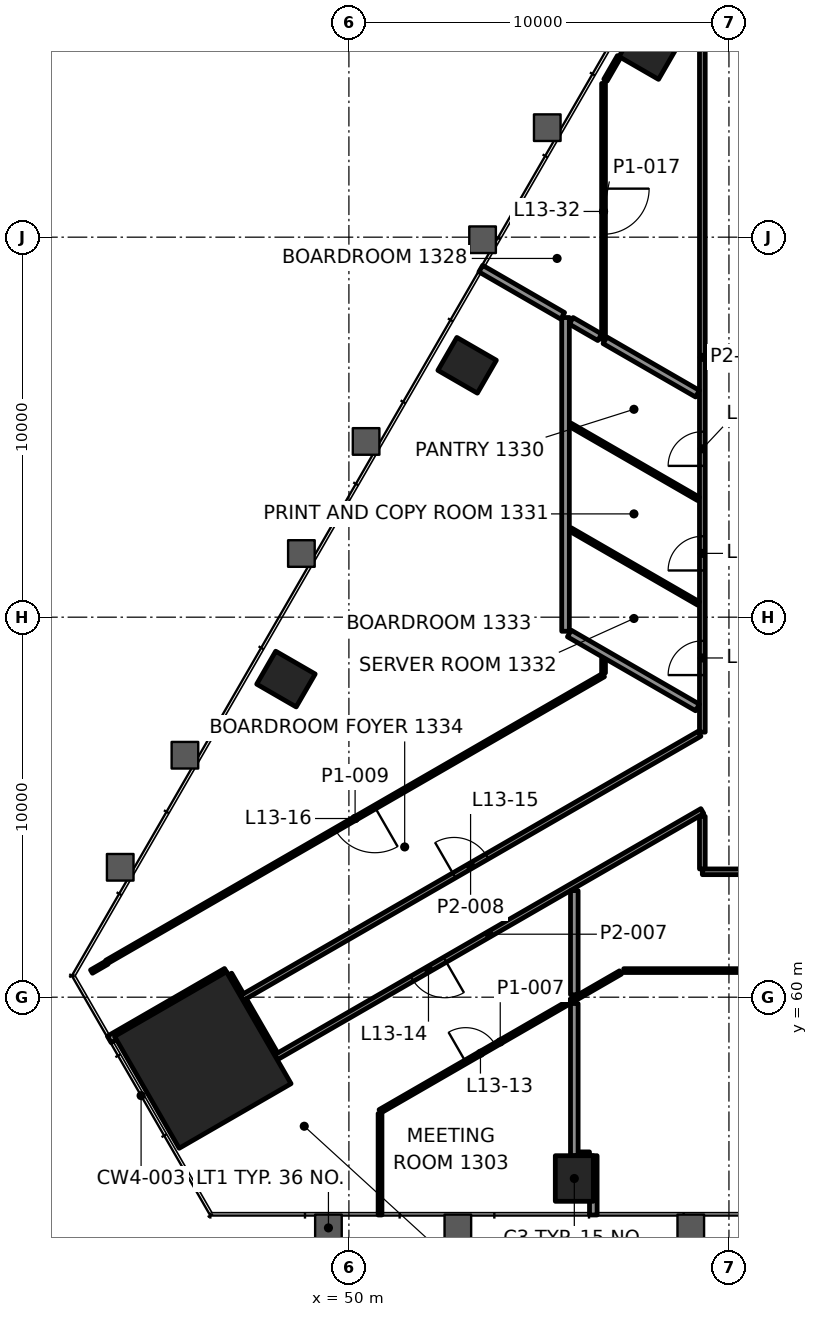
"""IFC4 building model, lengths in metres.
Left out: names, types, materials, properties, quantities, classifications, styles, units other than length and angle.
Written with IfcOpenShell. Run it as: python <this file> out.ifc"""

import sys

from ifc_helpers import new_model, si_unit, direction, frame, frame_2d, origin, origin_2d, place, context, subcontext, project, spatial, rectangle, extrude, element, fill, save


model = new_model("IFC4")
c1 = context("Model", 3, precision=1e-05, world=origin(), true_north=direction((0.0, 1.0)))
c2 = subcontext(c1, "Body", "Model", "MODEL_VIEW")
j1 = project(units=[si_unit("LENGTHUNIT", "METRE"), si_unit("PLANEANGLEUNIT", "RADIAN")], contexts=[c1])
p1 = place(None, origin())
s1 = spatial("IfcSite", under=j1, at=p1, CompositionType="ELEMENT")
p2 = place(p1, origin())
s2 = spatial("IfcBuilding", under=s1, at=p2, CompositionType="ELEMENT")
p3 = place(p2, frame((0.0, 0.0, 61.0)))
s3 = spatial("IfcBuildingStorey", under=s2, at=p3, CompositionType="ELEMENT", Elevation=61.0)
p4 = place(p3, frame((46.156, 58.347, 0.0), z_axis=(0.0, 0.0, 1.0), x_axis=(0.5, -0.866025403784, 0.0)))
e1 = element("IfcColumn", 1, at=p4, inside=s3, PredefinedType="COLUMN", context=c2, shape_type="SweptSolid", body=[
    extrude(rectangle(XDim=3.4, YDim=3.4, at=origin_2d()), origin(), (0.0, 0.0, 1.0), 4.2),
])
for number, where, z_axis, x_axis in (
    (2, (55.931, 55.229, -0.0), (0.0, 0.0, 1.0), (1.0, 0.0, 0.0)),
    (3, (57.878, 84.885, -0.0), (0.0, 0.0, 1.0), (-0.5, -0.866, 0.0)),
    (4, (53.111, 76.628, -0.0), (0.0, 0.0, 1.0), (-0.5, -0.866, 0.0)),
    (5, (48.343, 68.371, -0.0), (0.0, 0.0, 1.0), (-0.5, -0.866, 0.0)),
):
    element("IfcColumn", number, at=place(p3, frame(where, z_axis=z_axis, x_axis=x_axis)), inside=s3, PredefinedType="COLUMN", context=c2, shape_type="SweptSolid", body=[
        extrude(rectangle(XDim=1.0, YDim=1.2, at=origin_2d()), origin(), (0.0, 0.0, 1.0), 4.2),
    ])
p5 = place(p3, frame((56.031, 55.829, 0.0), z_axis=(0.0, 0.0, 1.0), x_axis=(1.0, 0.0, 0.0)))
e6 = element("IfcWall", 6, at=p5, inside=s3, PredefinedType="PARTITIONING", context=c2, shape_type="SweptSolid", body=[
    extrude(rectangle(XDim=0.3, YDim=0.2, at=frame_2d((0.15, 0.0))), origin(), (0.0, 0.0, 1.0), 3.4),
])
p6 = place(p3, frame((57.232, 60.7, 0.0), z_axis=(0.0, 0.0, 1.0), x_axis=(1.0, 0.0, 0.0)))
e7 = element("IfcWall", 7, at=p6, inside=s3, PredefinedType="PARTITIONING", context=c2, shape_type="SweptSolid", body=[
    extrude(rectangle(XDim=15.385, YDim=0.1, at=frame_2d((7.692, 0.0))), origin(), (0.0, 0.0, 1.0), 3.4),
])
p7 = place(p6, frame((7.192, 0.0, 0.0)))
e8 = element("IfcOpeningElement", 8, at=p7, cuts=e7, PredefinedType="OPENING", context=c2, shape_type="SweptSolid", body=[
    extrude(rectangle(XDim=1.0, YDim=2.1, at=frame_2d((0.5, 1.05))), frame((0.0, 0.06, 0.0), z_axis=(0.0, -1.0, 0.0), x_axis=(1.0, 0.0, 0.0)), (0.0, 0.0, 1.0), 0.12),
])
p8 = place(p3, frame((90.699, 63.3, 0.0), z_axis=(0.0, 0.0, 1.0), x_axis=(-1.0, 0.0, 0.0)))
e9 = element("IfcWall", 9, at=p8, inside=s3, PredefinedType="PARTITIONING", context=c2, shape_type="SweptSolid", body=[
    extrude(rectangle(XDim=31.399, YDim=0.15, at=frame_2d((15.7, 0.0))), origin(), (0.0, 0.0, 1.0), 3.4),
])
p9 = place(p8, frame((4.968, 0.0, 0.0)))
e10 = element("IfcOpeningElement", 10, at=p9, cuts=e9, PredefinedType="OPENING", context=c2, shape_type="SweptSolid", body=[
    extrude(rectangle(XDim=1.2, YDim=2.1, at=frame_2d((0.6, 1.05))), frame((0.0, 0.085, 0.0), z_axis=(0.0, -1.0, 0.0), x_axis=(1.0, 0.0, 0.0)), (0.0, 0.0, 1.0), 0.17),
])
p10 = place(p8, frame((13.908, 0.0, 0.0)))
e11 = element("IfcOpeningElement", 11, at=p10, cuts=e9, PredefinedType="OPENING", context=c2, shape_type="SweptSolid", body=[
    extrude(rectangle(XDim=1.2, YDim=2.1, at=frame_2d((0.6, 1.05))), frame((0.0, 0.085, 0.0), z_axis=(0.0, -1.0, 0.0), x_axis=(1.0, 0.0, 0.0)), (0.0, 0.0, 1.0), 0.17),
])
p11 = place(p8, frame((24.14, 0.0, 0.0)))
e12 = element("IfcOpeningElement", 12, at=p11, cuts=e9, PredefinedType="OPENING", context=c2, shape_type="SweptSolid", body=[
    extrude(rectangle(XDim=1.0, YDim=2.1, at=frame_2d((0.5, 1.05))), frame((0.0, 0.085, 0.0), z_axis=(0.0, -1.0, 0.0), x_axis=(1.0, 0.0, 0.0)), (0.0, 0.0, 1.0), 0.17),
])
p12 = place(p3, frame((50.819, 56.998, 0.0), z_axis=(0.0, 0.0, 1.0), x_axis=(0.866023631393, 0.50000306986, 0.0)))
e13 = element("IfcWall", 13, at=p12, inside=s3, PredefinedType="PARTITIONING", context=c2, shape_type="SweptSolid", body=[
    extrude(rectangle(XDim=7.305, YDim=0.1, at=frame_2d((3.653, 0.0))), origin(), (0.0, 0.0, 1.0), 3.4),
])
p13 = place(p12, frame((2.602, 0.0, 0.0)))
e14 = element("IfcOpeningElement", 14, at=p13, cuts=e13, PredefinedType="OPENING", context=c2, shape_type="SweptSolid", body=[
    extrude(rectangle(XDim=0.9, YDim=2.1, at=frame_2d((0.45, 1.05))), frame((0.0, 0.06, 0.0), z_axis=(0.0, -1.0, 0.0), x_axis=(1.0, 0.0, 0.0)), (0.0, 0.0, 1.0), 0.12),
])
p14 = place(p3, frame((59.3, 64.896, 0.0), z_axis=(0.0, 0.0, 1.0), x_axis=(-0.86602302899, -0.500004113243, 0.0)))
e15 = element("IfcWall", 15, at=p14, inside=s3, PredefinedType="PARTITIONING", context=c2, shape_type="SweptSolid", body=[
    extrude(rectangle(XDim=12.956, YDim=0.15, at=frame_2d((6.478, 0.0))), origin(), (0.0, 0.0, 1.0), 3.247),
])
p15 = place(p14, frame((7.821, 0.0, 0.0)))
e16 = element("IfcOpeningElement", 16, at=p15, cuts=e15, PredefinedType="OPENING", context=c2, shape_type="SweptSolid", body=[
    extrude(rectangle(XDim=1.0, YDim=2.1, at=frame_2d((0.5, 1.05))), frame((0.0, 0.085, 0.0), z_axis=(0.0, -1.0, 0.0), x_axis=(1.0, 0.0, 0.0)), (0.0, 0.0, 1.0), 0.17),
])
p16 = place(p3, frame((47.178, 59.976, 0.0), z_axis=(0.0, 0.0, 1.0), x_axis=(0.866019280802, 0.500010605167, 0.0)))
e17 = element("IfcWall", 17, at=p16, inside=s3, PredefinedType="PARTITIONING", context=c2, shape_type="SweptSolid", body=[
    extrude(rectangle(XDim=13.91, YDim=0.15, at=frame_2d((6.955, 0.0))), origin(), (0.0, 0.0, 1.0), 3.4),
])
p17 = place(p16, frame((6.455, 0.0, 0.0)))
e18 = element("IfcOpeningElement", 18, at=p17, cuts=e17, PredefinedType="OPENING", context=c2, shape_type="SweptSolid", body=[
    extrude(rectangle(XDim=1.0, YDim=2.1, at=frame_2d((0.5, 1.05))), frame((0.0, 0.085, 0.0), z_axis=(0.0, -1.0, 0.0), x_axis=(1.0, 0.0, 0.0)), (0.0, 0.0, 1.0), 0.17),
])
p18 = place(p3, frame((43.695, 58.888, 0.0), z_axis=(0.0, 0.0, 1.0), x_axis=(0.866031398331, 0.499989616998, 0.0)))
e19 = element("IfcWall", 19, at=p18, inside=s3, PredefinedType="PARTITIONING", context=c2, shape_type="SweptSolid", body=[
    extrude(rectangle(XDim=3.56, YDim=0.2, at=frame_2d((1.78, 0.0))), origin(), (0.0, 0.0, 1.0), 3.4),
])
p19 = place(p3, frame((43.226, 60.674, 0.0), z_axis=(0.0, 0.0, 1.0), x_axis=(0.866073792734, 0.499916178513, 0.0)))
e20 = element("IfcWall", 20, at=p19, inside=s3, PredefinedType="PARTITIONING", context=c2, shape_type="SweptSolid", body=[
    extrude(rectangle(XDim=0.473, YDim=0.1, at=frame_2d((0.236, 0.0))), origin(), (0.0, 0.0, 1.0), 3.4),
])
p20 = place(p3, frame((56.7, 68.476, 0.0), z_axis=(0.0, 0.0, 1.0), x_axis=(-0.866026152489, -0.499998703203, 0.0)))
e21 = element("IfcWall", 21, at=p20, inside=s3, PredefinedType="PARTITIONING", context=c2, shape_type="SweptSolid", body=[
    extrude(rectangle(XDim=15.096, YDim=0.1, at=frame_2d((7.548, 0.0))), origin(), (0.0, 0.0, 1.0), 3.4),
])
p21 = place(p20, frame((6.948, 0.0, 0.0)))
e22 = element("IfcOpeningElement", 22, at=p21, cuts=e21, PredefinedType="OPENING", context=c2, shape_type="SweptSolid", body=[
    extrude(rectangle(XDim=1.2, YDim=2.1, at=frame_2d((0.6, 1.05))), frame((0.0, 0.06, 0.0), z_axis=(0.0, -1.0, 0.0), x_axis=(1.0, 0.0, 0.0)), (0.0, 0.0, 1.0), 0.12),
])
p22 = place(p3, frame((56.75, 84.132, 0.0), z_axis=(0.0, 0.0, 1.0), x_axis=(0.49987987985, 0.866094744079, 0.0)))
e23 = element("IfcWall", 23, at=p22, inside=s3, PredefinedType="PARTITIONING", context=c2, shape_type="SweptSolid", body=[
    extrude(rectangle(XDim=0.716, YDim=0.1, at=frame_2d((0.358, 0.0))), origin(), (0.0, 0.0, 1.0), 3.4),
])
p23 = place(p3, frame((59.3, 63.375, 0.0), z_axis=(0.0, 0.0, 1.0), x_axis=(0.0, 1.0, 0.0)))
e24 = element("IfcWall", 24, at=p23, inside=s3, PredefinedType="PARTITIONING", context=c2, shape_type="SweptSolid", body=[
    extrude(rectangle(XDim=1.385, YDim=0.15, at=frame_2d((0.692, 0.0))), origin(), (0.0, 0.0, 1.0), 3.247),
])
p24 = place(p3, frame((59.3, 66.975, 0.0), z_axis=(0.0, 0.0, 1.0), x_axis=(0.0, 1.0, 0.0)))
e25 = element("IfcWall", 25, at=p24, inside=s3, PredefinedType="PARTITIONING", context=c2, shape_type="SweptSolid", body=[
    extrude(rectangle(XDim=19.725, YDim=0.15, at=frame_2d((9.862, 0.0))), origin(), (0.0, 0.0, 1.0), 3.4),
])
p25 = place(p24, frame((1.502, 0.0, 0.0)))
e26 = element("IfcOpeningElement", 26, at=p25, cuts=e25, PredefinedType="OPENING", context=c2, shape_type="SweptSolid", body=[
    extrude(rectangle(XDim=0.9, YDim=2.1, at=frame_2d((0.45, 1.05))), frame((0.0, 0.085, 0.0), z_axis=(0.0, -1.0, 0.0), x_axis=(1.0, 0.0, 0.0)), (0.0, 0.0, 1.0), 0.17),
])
p26 = place(p24, frame((4.254, 0.0, 0.0)))
e27 = element("IfcOpeningElement", 27, at=p26, cuts=e25, PredefinedType="OPENING", context=c2, shape_type="SweptSolid", body=[
    extrude(rectangle(XDim=0.9, YDim=2.1, at=frame_2d((0.45, 1.05))), frame((0.0, 0.085, 0.0), z_axis=(0.0, -1.0, 0.0), x_axis=(1.0, 0.0, 0.0)), (0.0, 0.0, 1.0), 0.17),
])
p27 = place(p24, frame((7.007, 0.0, 0.0)))
e28 = element("IfcOpeningElement", 28, at=p27, cuts=e25, PredefinedType="OPENING", context=c2, shape_type="SweptSolid", body=[
    extrude(rectangle(XDim=0.9, YDim=2.1, at=frame_2d((0.45, 1.05))), frame((0.0, 0.085, 0.0), z_axis=(0.0, -1.0, 0.0), x_axis=(1.0, 0.0, 0.0)), (0.0, 0.0, 1.0), 0.17),
])
p28 = place(p3, frame((56.7, 68.534, 0.0), z_axis=(0.0, 0.0, 1.0), x_axis=(0.0, 1.0, 0.0)))
e29 = element("IfcWall", 29, at=p28, inside=s3, PredefinedType="PARTITIONING", context=c2, shape_type="SweptSolid", body=[
    extrude(rectangle(XDim=0.372, YDim=0.1, at=frame_2d((0.186, 0.0))), origin(), (0.0, 0.0, 1.0), 3.4),
])
p29 = place(p3, frame((56.7, 84.046, 0.0), z_axis=(0.0, 0.0, 1.0), x_axis=(0.0, -1.0, 0.0)))
e30 = element("IfcWall", 30, at=p29, inside=s3, PredefinedType="PARTITIONING", context=c2, shape_type="SweptSolid", body=[
    extrude(rectangle(XDim=6.737, YDim=0.1, at=frame_2d((3.369, 0.0))), origin(), (0.0, 0.0, 1.0), 3.165),
])
p30 = place(p29, frame((2.769, 0.0, 0.0)))
e31 = element("IfcOpeningElement", 31, at=p30, cuts=e30, PredefinedType="OPENING", context=c2, shape_type="SweptSolid", body=[
    extrude(rectangle(XDim=1.2, YDim=2.1, at=frame_2d((0.6, 1.05))), frame((0.0, 0.06, 0.0), z_axis=(0.0, -1.0, 0.0), x_axis=(1.0, 0.0, 0.0)), (0.0, 0.0, 1.0), 0.12),
])
p31 = place(p3, frame((56.431, 54.269, 0.0), z_axis=(0.0, 0.0, 1.0), x_axis=(0.0, 1.0, 0.0)))
e32 = element("IfcWall", 32, at=p31, inside=s3, PredefinedType="PARTITIONING", context=c2, shape_type="SweptSolid", body=[
    extrude(rectangle(XDim=1.56, YDim=0.2, at=frame_2d((0.78, 0.0))), origin(), (0.0, 0.0, 1.0), 3.165),
])
p32 = place(p3, frame((55.931, 55.829, 0.0), z_axis=(0.0, 0.0, 1.0), x_axis=(0.0, 1.0, 0.0)))
e33 = element("IfcWall", 33, at=p32, inside=s3, PredefinedType="PARTITIONING", context=c2, shape_type="SweptSolid", body=[
    extrude(rectangle(XDim=4.005, YDim=0.2, at=frame_2d((2.002, 0.0))), origin(), (0.0, 0.0, 1.0), 3.4),
])
p33 = place(p3, frame((55.7, 69.63, 0.0), z_axis=(0.0, 0.0, 1.0), x_axis=(0.0, 1.0, 0.0)))
e34 = element("IfcWall", 34, at=p33, inside=s3, PredefinedType="PARTITIONING", context=c2, shape_type="SweptSolid", body=[
    extrude(rectangle(XDim=8.256, YDim=0.2, at=frame_2d((4.128, 0.0))), origin(), (0.0, 0.0, 1.0), 3.4),
])
p34 = place(p3, frame((50.819, 54.269, 0.0), z_axis=(0.0, 0.0, 1.0), x_axis=(0.0, 1.0, 0.0)))
e35 = element("IfcWall", 35, at=p34, inside=s3, PredefinedType="PARTITIONING", context=c2, shape_type="SweptSolid", body=[
    extrude(rectangle(XDim=2.671, YDim=0.1, at=frame_2d((1.335, 0.0))), origin(), (0.0, 0.0, 1.0), 3.4),
])
p35 = place(p3, frame((48.039, 58.485, 0.0), z_axis=(0.0, 0.0, 1.0), x_axis=(-0.499949127178, 0.86605477323, 0.0)))
e36 = element("IfcWall", 36, at=p35, inside=s3, PredefinedType="PARTITIONING", context=c2, shape_type="SweptSolid", body=[
    extrude(rectangle(XDim=1.647, YDim=0.2, at=frame_2d((0.824, 0.0))), origin(), (0.0, 0.0, 1.0), 3.247),
])
p36 = place(p3, frame((59.173, 75.881, 0.0), z_axis=(0.0, 0.0, 1.0), x_axis=(-0.866049697453, 0.499957919771, 0.0)))
e37 = element("IfcWall", 37, at=p36, inside=s3, PredefinedType="PARTITIONING", context=c2, shape_type="SweptSolid", body=[
    extrude(rectangle(XDim=2.812, YDim=0.2, at=frame_2d((1.406, 0.0))), origin(), (0.0, 0.0, 1.0), 3.4),
])
p37 = place(p3, frame((59.199, 73.113, 0.0), z_axis=(0.0, 0.0, 1.0), x_axis=(-0.866016482536, 0.500015451737, 0.0)))
e38 = element("IfcWall", 38, at=p37, inside=s3, PredefinedType="PARTITIONING", context=c2, shape_type="SweptSolid", body=[
    extrude(rectangle(XDim=3.895, YDim=0.1, at=frame_2d((1.948, 0.0))), origin(), (0.0, 0.0, 1.0), 3.4),
])
p38 = place(p3, frame((59.199, 70.361, 0.0), z_axis=(0.0, 0.0, 1.0), x_axis=(-0.866043624834, 0.499968438888, 0.0)))
e39 = element("IfcWall", 39, at=p38, inside=s3, PredefinedType="PARTITIONING", context=c2, shape_type="SweptSolid", body=[
    extrude(rectangle(XDim=3.895, YDim=0.1, at=frame_2d((1.947, 0.0))), origin(), (0.0, 0.0, 1.0), 3.4),
])
p39 = place(p3, frame((59.173, 67.623, 0.0), z_axis=(0.0, 0.0, 1.0), x_axis=(-0.866000809756, 0.500042595688, 0.0)))
e40 = element("IfcWall", 40, at=p39, inside=s3, PredefinedType="PARTITIONING", context=c2, shape_type="SweptSolid", body=[
    extrude(rectangle(XDim=3.895, YDim=0.2, at=frame_2d((1.947, 0.0))), origin(), (0.0, 0.0, 1.0), 3.4),
])
p40 = place(p3, frame((55.931, 60.065, 0.0), z_axis=(0.0, 0.0, 1.0), x_axis=(0.0, 1.0, 0.0)))
e41 = element("IfcWall", 41, at=p40, inside=s3, PredefinedType="PARTITIONING", context=c2, shape_type="SweptSolid", body=[
    extrude(rectangle(XDim=2.74, YDim=0.2, at=frame_2d((1.37, 0.0))), origin(), (0.0, 0.0, 1.0), 3.4),
])
p41 = place(p3, frame((47.14, 60.041, 0.0), z_axis=(0.0, 0.0, 1.0), x_axis=(-0.500049599607, 0.865996765544, 0.0)))
e42 = element("IfcWall", 42, at=p41, inside=s3, PredefinedType="PARTITIONING", context=c2, shape_type="SweptSolid", body=[
    extrude(rectangle(XDim=0.625, YDim=0.2, at=frame_2d((0.312, 0.0))), origin(), (0.0, 0.0, 1.0), 3.4),
])
p42 = place(p3, frame((56.6, 77.366, 0.0), z_axis=(0.0, 0.0, 1.0), x_axis=(-0.866101087359, 0.499868889286, 0.0)))
e43 = element("IfcWall", 43, at=p42, inside=s3, PredefinedType="PARTITIONING", context=c2, shape_type="SweptSolid", body=[
    extrude(rectangle(XDim=0.866, YDim=0.2, at=frame_2d((0.433, 0.0))), origin(), (0.0, 0.0, 1.0), 3.4),
])
p43 = place(p3, frame((55.625, 77.929, 0.0), z_axis=(0.0, 0.0, 1.0), x_axis=(-0.86602376425, 0.500002839747, 0.0)))
e44 = element("IfcWall", 44, at=p43, inside=s3, PredefinedType="PARTITIONING", context=c2, shape_type="SweptSolid", body=[
    extrude(rectangle(XDim=2.487, YDim=0.2, at=frame_2d((1.244, 0.0))), origin(), (0.0, 0.0, 1.0), 3.165),
])
p44 = place(p13, origin())
e45 = element("IfcDoor", 45, at=p44, inside=s3, OperationType="SINGLE_SWING_RIGHT", PredefinedType="DOOR", context=c2, shape_type="SweptSolid", body=[
    extrude(rectangle(XDim=0.9, YDim=2.1, at=frame_2d((0.45, 1.05))), frame((0.0, 0.025, 0.0), z_axis=(0.0, -1.0, 0.0), x_axis=(1.0, 0.0, 0.0)), (0.0, 0.0, 1.0), 0.05),
])
fill(e14, e45)
p45 = place(p15, origin())
e46 = element("IfcDoor", 46, at=p45, inside=s3, OperationType="SINGLE_SWING_RIGHT", PredefinedType="DOOR", context=c2, shape_type="SweptSolid", body=[
    extrude(rectangle(XDim=1.0, YDim=2.1, at=frame_2d((0.5, 1.05))), frame((0.0, 0.025, 0.0), z_axis=(0.0, -1.0, 0.0), x_axis=(1.0, 0.0, 0.0)), (0.0, 0.0, 1.0), 0.05),
])
fill(e16, e46)
p46 = place(p17, origin())
e47 = element("IfcDoor", 47, at=p46, inside=s3, OperationType="SINGLE_SWING_LEFT", PredefinedType="DOOR", context=c2, shape_type="SweptSolid", body=[
    extrude(rectangle(XDim=1.0, YDim=2.1, at=frame_2d((0.5, 1.05))), frame((0.0, 0.025, 0.0), z_axis=(0.0, -1.0, 0.0), x_axis=(1.0, 0.0, 0.0)), (0.0, 0.0, 1.0), 0.05),
])
fill(e18, e47)
p47 = place(p21, origin())
e48 = element("IfcDoor", 48, at=p47, inside=s3, OperationType="DOUBLE_DOOR_SINGLE_SWING", PredefinedType="DOOR", context=c2, shape_type="SweptSolid", body=[
    extrude(rectangle(XDim=1.2, YDim=2.1, at=frame_2d((0.6, 1.05))), frame((0.0, 0.025, 0.0), z_axis=(0.0, -1.0, 0.0), x_axis=(1.0, 0.0, 0.0)), (0.0, 0.0, 1.0), 0.05),
])
fill(e22, e48)
p48 = place(p25, origin())
e49 = element("IfcDoor", 49, at=p48, inside=s3, OperationType="SINGLE_SWING_LEFT", PredefinedType="DOOR", context=c2, shape_type="SweptSolid", body=[
    extrude(rectangle(XDim=0.9, YDim=2.1, at=frame_2d((0.45, 1.05))), frame((0.0, 0.025, 0.0), z_axis=(0.0, -1.0, 0.0), x_axis=(1.0, 0.0, 0.0)), (0.0, 0.0, 1.0), 0.05),
])
fill(e26, e49)
p49 = place(p26, origin())
e50 = element("IfcDoor", 50, at=p49, inside=s3, OperationType="SINGLE_SWING_RIGHT", PredefinedType="DOOR", context=c2, shape_type="SweptSolid", body=[
    extrude(rectangle(XDim=0.9, YDim=2.1, at=frame_2d((0.45, 1.05))), frame((0.0, 0.025, 0.0), z_axis=(0.0, -1.0, 0.0), x_axis=(1.0, 0.0, 0.0)), (0.0, 0.0, 1.0), 0.05),
])
fill(e27, e50)
p50 = place(p27, origin())
e51 = element("IfcDoor", 51, at=p50, inside=s3, OperationType="SINGLE_SWING_LEFT", PredefinedType="DOOR", context=c2, shape_type="SweptSolid", body=[
    extrude(rectangle(XDim=0.9, YDim=2.1, at=frame_2d((0.45, 1.05))), frame((0.0, 0.025, 0.0), z_axis=(0.0, -1.0, 0.0), x_axis=(1.0, 0.0, 0.0)), (0.0, 0.0, 1.0), 0.05),
])
fill(e28, e51)
p51 = place(p30, origin())
e52 = element("IfcDoor", 52, at=p51, inside=s3, OperationType="DOUBLE_DOOR_SINGLE_SWING", PredefinedType="DOOR", context=c2, shape_type="SweptSolid", body=[
    extrude(rectangle(XDim=1.2, YDim=2.1, at=frame_2d((0.6, 1.05))), frame((0.0, 0.025, 0.0), z_axis=(0.0, -1.0, 0.0), x_axis=(1.0, 0.0, 0.0)), (0.0, 0.0, 1.0), 0.05),
])
fill(e31, e52)
save(model, sys.argv[1])
